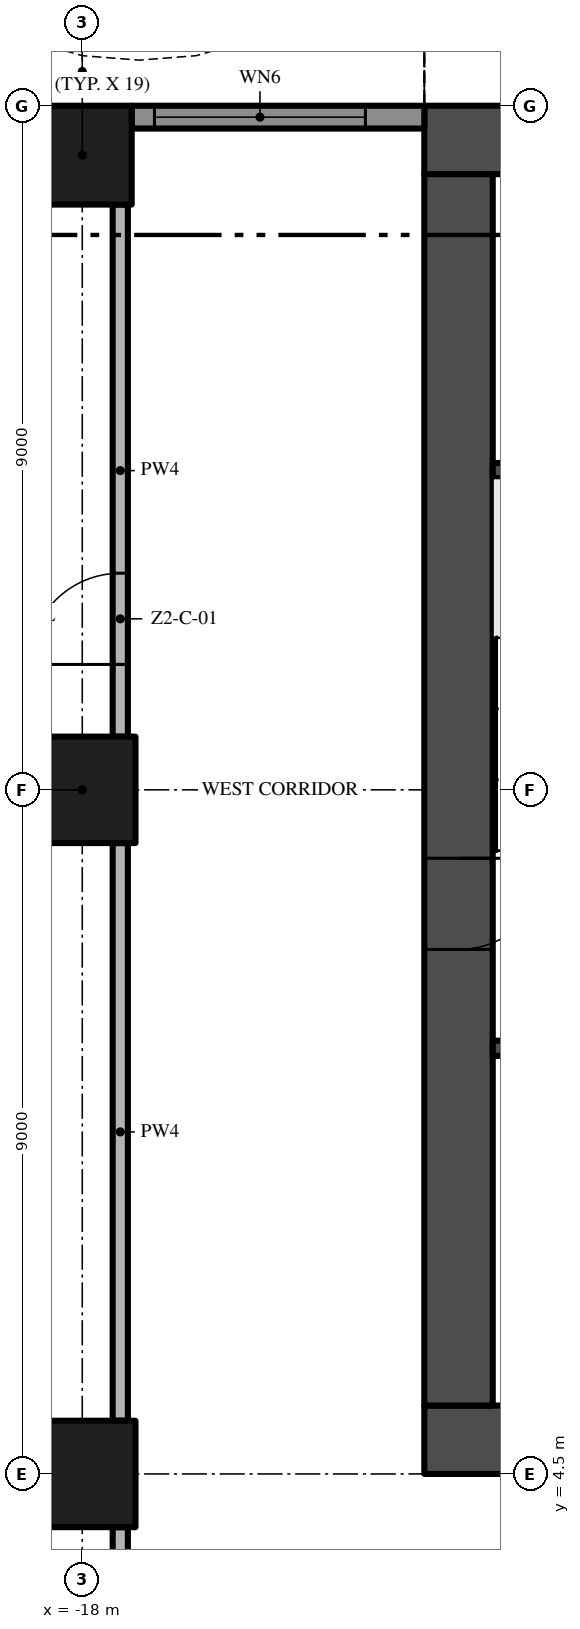
"""IFC4 building model, lengths in metres.
Left out: names, types, materials, properties, quantities, classifications, styles, units other than length and angle.
Written with IfcOpenShell. Run it as: python <this file> out.ifc"""

import sys

from ifc_helpers import new_model, si_unit, direction, frame, frame_2d, origin, origin_2d, place, context, subcontext, project, spatial, polyline, rectangle, outline, extrude, element, fill, save


model = new_model("IFC4")
c1 = context("Model", 3, precision=1e-05, world=origin(), true_north=direction((0.0, 1.0)))
c2 = subcontext(c1, "Body", "Model", "MODEL_VIEW")
j1 = project(units=[si_unit("LENGTHUNIT", "METRE"), si_unit("PLANEANGLEUNIT", "RADIAN")], contexts=[c1])
p1 = place(None, origin())
s1 = spatial("IfcSite", under=j1, at=p1, CompositionType="ELEMENT")
p2 = place(p1, origin())
s2 = spatial("IfcBuilding", under=s1, at=p2, CompositionType="ELEMENT")
p3 = place(p2, frame((0.0, 0.0, 92.2)))
s3 = spatial("IfcBuildingStorey", under=s2, at=p3, CompositionType="ELEMENT", Elevation=92.2)
p4 = place(p3, frame((-13.5, 4.95, -0.3), z_axis=(0.0, 0.0, 1.0), x_axis=(1.0, 0.0, 0.0)))
e1 = element("IfcWall", 1, at=p4, inside=s3, PredefinedType="SHEAR", context=c2, shape_type="SweptSolid", body=[
    extrude(rectangle(XDim=27.0, YDim=0.9, at=frame_2d((13.5, 0.0))), origin(), (0.0, 0.0, 1.0), 3.8),
])
p5 = place(p4, frame((12.0, 0.0, 0.3)))
e2 = element("IfcOpeningElement", 2, at=p5, cuts=e1, PredefinedType="OPENING", context=c2, shape_type="SweptSolid", body=[
    extrude(rectangle(XDim=3.0, YDim=2.4, at=frame_2d((1.5, 1.2))), frame((0.0, 0.46, 0.0), z_axis=(0.0, -1.0, 0.0), x_axis=(1.0, 0.0, 0.0)), (0.0, 0.0, 1.0), 0.92),
])
p6 = place(p4, frame((4.9, 0.0, 0.3)))
e3 = element("IfcOpeningElement", 3, at=p6, cuts=e1, PredefinedType="OPENING", context=c2, shape_type="SweptSolid", body=[
    extrude(rectangle(XDim=1.2, YDim=2.2, at=frame_2d((0.6, 1.1))), frame((0.0, 0.46, 0.0), z_axis=(0.0, -1.0, 0.0), x_axis=(1.0, 0.0, 0.0)), (0.0, 0.0, 1.0), 0.92),
])
p7 = place(p4, frame((20.75, 0.0, 0.3)))
e4 = element("IfcOpeningElement", 4, at=p7, cuts=e1, PredefinedType="OPENING", context=c2, shape_type="SweptSolid", body=[
    extrude(rectangle(XDim=1.5, YDim=2.2, at=frame_2d((0.75, 1.1))), frame((0.0, 0.46, 0.0), z_axis=(0.0, -1.0, 0.0), x_axis=(1.0, 0.0, 0.0)), (0.0, 0.0, 1.0), 0.92),
])
p8 = place(p4, frame((17.4, 0.0, 0.3)))
e5 = element("IfcOpeningElement", 5, at=p8, cuts=e1, PredefinedType="OPENING", context=c2, shape_type="SweptSolid", body=[
    extrude(rectangle(XDim=1.2, YDim=2.2, at=frame_2d((0.6, 1.1))), frame((0.0, 0.46, 0.0), z_axis=(0.0, -1.0, 0.0), x_axis=(1.0, 0.0, 0.0)), (0.0, 0.0, 1.0), 0.92),
])
p9 = place(p3, frame((13.5, 22.05, -0.3), z_axis=(0.0, 0.0, 1.0), x_axis=(-1.0, 0.0, 0.0)))
e6 = element("IfcWall", 6, at=p9, inside=s3, PredefinedType="SHEAR", context=c2, shape_type="SweptSolid", body=[
    extrude(rectangle(XDim=27.0, YDim=0.9, at=frame_2d((13.5, 0.0))), origin(), (0.0, 0.0, 1.0), 3.8),
])
p10 = place(p3, frame((-13.05, 21.6, -0.3), z_axis=(0.0, 0.0, 1.0), x_axis=(0.0, -1.0, 0.0)))
e7 = element("IfcWall", 7, at=p10, inside=s3, PredefinedType="SHEAR", context=c2, shape_type="SweptSolid", body=[
    extrude(rectangle(XDim=16.2, YDim=0.9, at=frame_2d((8.1, 0.0))), origin(), (0.0, 0.0, 1.0), 3.8),
])
p11 = place(p10, frame((9.0, 0.0, 0.3)))
e8 = element("IfcOpeningElement", 8, at=p11, cuts=e7, PredefinedType="OPENING", context=c2, shape_type="SweptSolid", body=[
    extrude(rectangle(XDim=1.2, YDim=2.2, at=frame_2d((0.6, 1.1))), frame((0.0, 0.46, 0.0), z_axis=(0.0, -1.0, 0.0), x_axis=(1.0, 0.0, 0.0)), (0.0, 0.0, 1.0), 0.92),
])
p12 = place(p3, frame((-18.0, 13.5, 0.0), z_axis=(0.0, 0.0, 1.0), x_axis=(1.0, 0.0, 0.0)))
e9 = element("IfcColumn", 9, at=p12, inside=s3, PredefinedType="COLUMN", context=c2, shape_type="SweptSolid", body=[
    extrude(rectangle(XDim=1.4, YDim=1.4, at=origin_2d()), origin(), (0.0, 0.0, 1.0), 3.5),
])
p13 = place(p3, frame((-18.0, 21.85, 0.0), z_axis=(0.0, 0.0, 1.0), x_axis=(1.0, 0.0, 0.0)))
e10 = element("IfcColumn", 10, at=p13, inside=s3, PredefinedType="COLUMN", context=c2, shape_type="SweptSolid", body=[
    extrude(rectangle(XDim=1.3, YDim=1.3, at=origin_2d()), origin(), (0.0, 0.0, 1.0), 3.5),
])
p14 = place(p3, frame((-18.0, 4.5, 0.0), z_axis=(0.0, 0.0, 1.0), x_axis=(1.0, 0.0, 0.0)))
e11 = element("IfcColumn", 11, at=p14, inside=s3, PredefinedType="COLUMN", context=c2, shape_type="SweptSolid", body=[
    extrude(rectangle(XDim=1.4, YDim=1.4, at=origin_2d()), origin(), (0.0, 0.0, 1.0), 3.5),
])
p15 = place(p3, frame((-17.35, 22.35, 0.0), z_axis=(0.0, 0.0, 1.0), x_axis=(1.0, 0.0, 0.0)))
e12 = element("IfcWall", 12, at=p15, inside=s3, PredefinedType="SOLIDWALL", context=c2, shape_type="SweptSolid", body=[
    extrude(rectangle(XDim=3.85, YDim=0.3, at=frame_2d((1.925, 0.0))), origin(), (0.0, 0.0, 1.0), 3.5),
])
p16 = place(p15, frame((0.3, 0.0, 0.45)))
e13 = element("IfcOpeningElement", 13, at=p16, cuts=e12, PredefinedType="OPENING", context=c2, shape_type="SweptSolid", body=[
    extrude(rectangle(XDim=2.775, YDim=2.65, at=frame_2d((1.387, 1.325))), frame((0.0, 0.16, 0.0), z_axis=(0.0, -1.0, 0.0), x_axis=(1.0, 0.0, 0.0)), (0.0, 0.0, 1.0), 0.32),
])
p17 = place(p3, origin())
e14 = element("IfcWall", 14, at=p17, inside=s3, PredefinedType="USERDEFINED", context=c2, shape_type="SweptSolid", body=[
    extrude(outline(polyline([(-13.5, 24.3), (-15.0, 23.595), (-16.5, 23.159), (-17.25, 23.1), (-18.0, 23.159), (-19.5, 23.595), (-21.0, 24.3), (-22.5, 25.005), (-22.606, 24.779), (-21.106, 24.074), (-19.589, 23.36), (-18.045, 22.911), (-17.25, 22.849), (-16.455, 22.911), (-14.911, 23.36), (-13.394, 24.074), (-13.5, 24.3)])), origin(), (0.0, 0.0, 1.0), 0.9),
])
for number, where, z_axis, x_axis in (
    (15, (-12.6, 10.1, 0.0), (0.0, 0.0, 1.0), (1.0, 0.0, 0.0)),
    (16, (-12.6, 17.7, 0.0), (0.0, 0.0, 1.0), (1.0, 0.0, 0.0)),
):
    element("IfcWall", number, at=place(p3, frame(where, z_axis=z_axis, x_axis=x_axis)), inside=s3, PredefinedType="SHEAR", context=c2, shape_type="SweptSolid", body=[
        extrude(rectangle(XDim=2.95, YDim=0.2, at=frame_2d((1.475, 0.0))), origin(), (0.0, 0.0, 1.0), 3.5),
    ])
p18 = place(p3, frame((-17.5, -0.2, 0.0), z_axis=(0.0, 0.0, 1.0), x_axis=(0.0, 1.0, 0.0)))
e17 = element("IfcWall", 17, at=p18, inside=s3, PredefinedType="PARTITIONING", context=c2, shape_type="SweptSolid", body=[
    extrude(rectangle(XDim=4.0, YDim=0.2, at=frame_2d((2.0, 0.0))), origin(), (0.0, 0.0, 1.0), 3.5),
])
p19 = place(p3, frame((-17.5, 5.2, 0.0), z_axis=(0.0, 0.0, 1.0), x_axis=(0.0, 1.0, 0.0)))
e18 = element("IfcWall", 18, at=p19, inside=s3, PredefinedType="PARTITIONING", context=c2, shape_type="SweptSolid", body=[
    extrude(rectangle(XDim=7.6, YDim=0.2, at=frame_2d((3.8, 0.0))), origin(), (0.0, 0.0, 1.0), 3.5),
])
p20 = place(p3, frame((-17.5, 14.2, 0.0), z_axis=(0.0, 0.0, 1.0), x_axis=(0.0, 1.0, 0.0)))
e19 = element("IfcWall", 19, at=p20, inside=s3, PredefinedType="PARTITIONING", context=c2, shape_type="SweptSolid", body=[
    extrude(rectangle(XDim=7.0, YDim=0.2, at=frame_2d((3.5, 0.0))), origin(), (0.0, 0.0, 1.0), 3.5),
])
p21 = place(p20, frame((0.95, 0.0, 0.0)))
e20 = element("IfcOpeningElement", 20, at=p21, cuts=e19, PredefinedType="OPENING", context=c2, shape_type="SweptSolid", body=[
    extrude(rectangle(XDim=1.2, YDim=2.4, at=frame_2d((0.6, 1.2))), frame((0.0, 0.11, 0.0), z_axis=(0.0, -1.0, 0.0), x_axis=(1.0, 0.0, 0.0)), (0.0, 0.0, 1.0), 0.22),
])
p22 = place(p16, origin())
e21 = element("IfcWindow", 21, at=p22, inside=s3, PartitioningType="SINGLE_PANEL", PredefinedType="WINDOW", context=c2, shape_type="SweptSolid", body=[
    extrude(rectangle(XDim=2.775, YDim=2.65, at=frame_2d((1.387, 1.325))), frame((0.0, 0.03, 0.0), z_axis=(0.0, -1.0, 0.0), x_axis=(1.0, 0.0, 0.0)), (0.0, 0.0, 1.0), 0.06),
])
fill(e13, e21)
p23 = place(p11, frame((1.2, 0.0, 0.0), z_axis=(0.0, 0.0, 1.0), x_axis=(-1.0, 0.0, 0.0)))
e22 = element("IfcDoor", 22, at=p23, inside=s3, OperationType="SINGLE_SWING_RIGHT", PredefinedType="DOOR", context=c2, shape_type="SweptSolid", body=[
    extrude(rectangle(XDim=1.2, YDim=2.2, at=frame_2d((0.6, 1.1))), frame((0.0, 0.025, 0.0), z_axis=(0.0, -1.0, 0.0), x_axis=(1.0, 0.0, 0.0)), (0.0, 0.0, 1.0), 0.05),
])
fill(e8, e22)
p24 = place(p21, origin())
e23 = element("IfcDoor", 23, at=p24, inside=s3, OperationType="SINGLE_SWING_LEFT", PredefinedType="DOOR", context=c2, shape_type="SweptSolid", body=[
    extrude(rectangle(XDim=1.2, YDim=2.4, at=frame_2d((0.6, 1.2))), frame((0.0, 0.025, 0.0), z_axis=(0.0, -1.0, 0.0), x_axis=(1.0, 0.0, 0.0)), (0.0, 0.0, 1.0), 0.05),
])
fill(e20, e23)
save(model, sys.argv[1])
